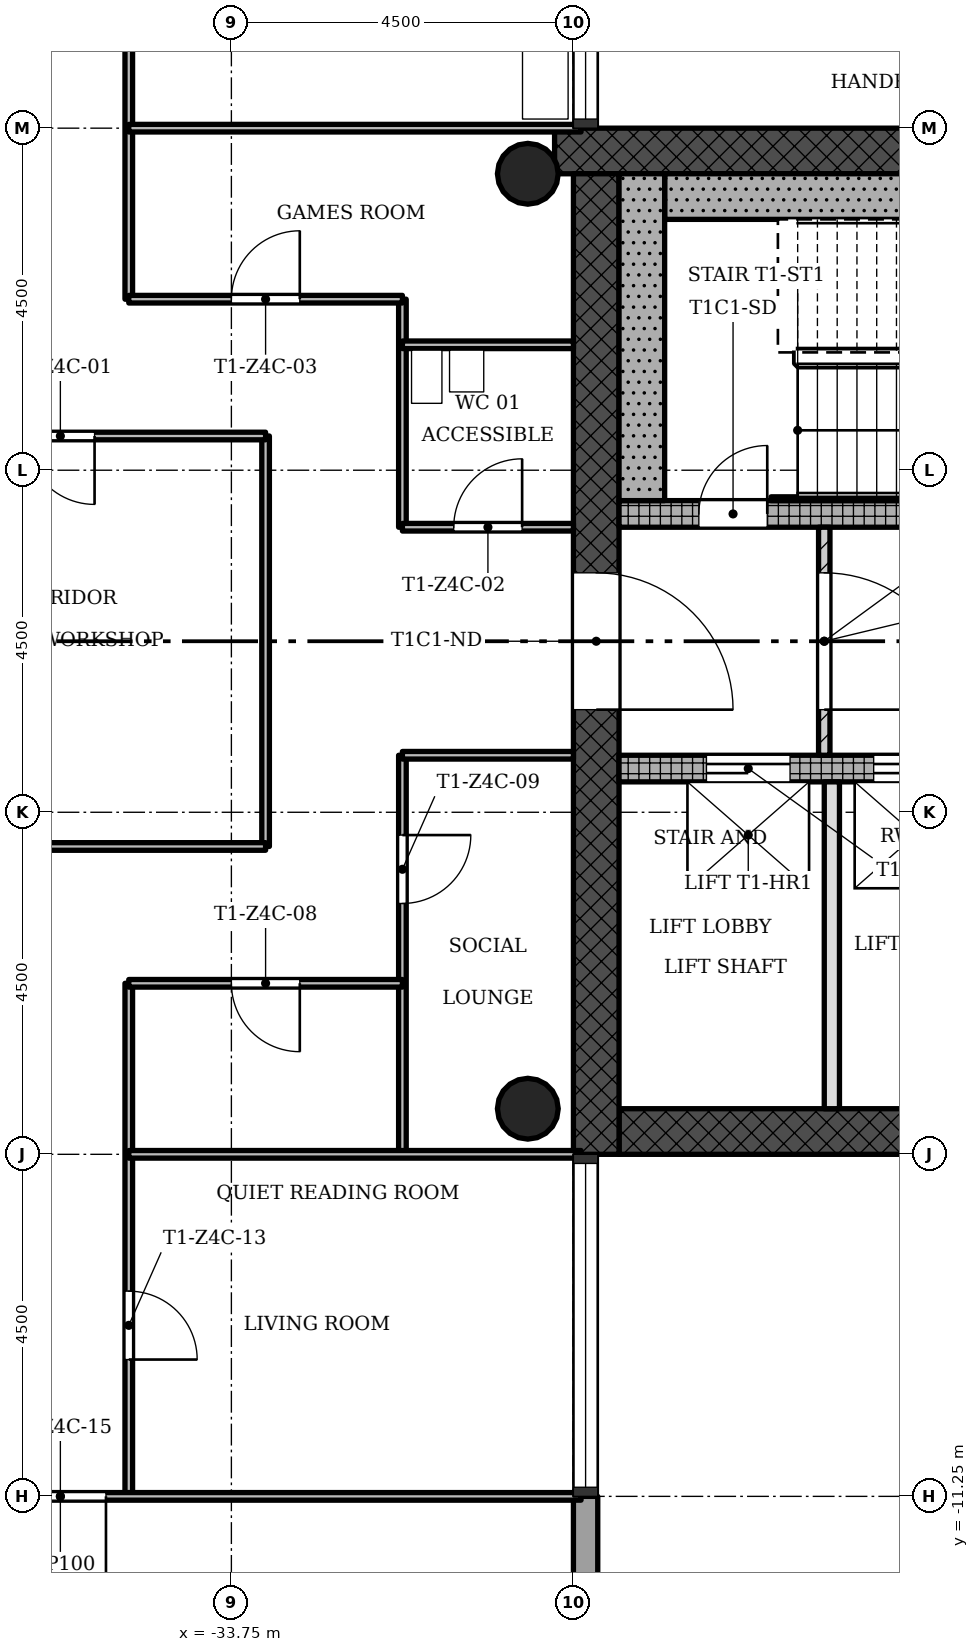
"""IFC4 building model, lengths in metres.
Left out: names, types, materials, properties, quantities, classifications, styles, units other than length and angle.
Written with IfcOpenShell. Run it as: python <this file> out.ifc"""

import sys

from ifc_helpers import new_model, si_unit, direction, frame, frame_2d, origin, origin_2d, place, context, subcontext, project, spatial, rectangle, hollow_circle, extrude, element, fill, save


model = new_model("IFC4")
c1 = context("Model", 3, precision=1e-05, world=origin(), true_north=direction((0.0, 1.0)))
c2 = subcontext(c1, "Body", "Model", "MODEL_VIEW")
j1 = project(units=[si_unit("LENGTHUNIT", "METRE"), si_unit("PLANEANGLEUNIT", "RADIAN")], contexts=[c1])
p1 = place(None, origin())
s1 = spatial("IfcSite", under=j1, at=p1, CompositionType="ELEMENT")
p2 = place(p1, origin())
s2 = spatial("IfcBuilding", under=s1, at=p2, CompositionType="ELEMENT")
p3 = place(p2, frame((0.0, 0.0, 185.8)))
s3 = spatial("IfcBuildingStorey", under=s2, at=p3, CompositionType="ELEMENT", Elevation=185.8)
p4 = place(p3, frame((-28.65, -6.45, 0.0), z_axis=(0.0, 0.0, 1.0), x_axis=(1.0, 0.0, 0.0)))
e1 = element("IfcWall", 1, at=p4, inside=s3, PredefinedType="SHEAR", context=c2, shape_type="SweptSolid", body=[
    extrude(rectangle(XDim=8.4, YDim=0.6, at=frame_2d((4.2, 0.0))), origin(), (0.0, 0.0, 1.0), 3.4),
])
p5 = place(p3, frame((-20.602, 6.45, 0.0), z_axis=(0.0, 0.0, 1.0), x_axis=(-1.0, 0.0, 0.0)))
e2 = element("IfcWall", 2, at=p5, inside=s3, PredefinedType="SHEAR", context=c2, shape_type="SweptSolid", body=[
    extrude(rectangle(XDim=8.896, YDim=0.6, at=frame_2d((4.448, 0.0))), origin(), (0.0, 0.0, 1.0), 3.4),
])
p6 = place(p3, frame((-28.95, 6.15, 0.0), z_axis=(0.0, 0.0, 1.0), x_axis=(0.0, -1.0, 0.0)))
e3 = element("IfcWall", 3, at=p6, inside=s3, PredefinedType="SHEAR", context=c2, shape_type="SweptSolid", body=[
    extrude(rectangle(XDim=12.9, YDim=0.6, at=frame_2d((6.45, 0.0))), origin(), (0.0, 0.0, 1.0), 3.4),
])
p7 = place(p6, frame((5.25, 0.0, 0.0)))
e4 = element("IfcOpeningElement", 4, at=p7, cuts=e3, PredefinedType="OPENING", context=c2, shape_type="SweptSolid", body=[
    extrude(rectangle(XDim=1.8, YDim=2.1, at=frame_2d((0.9, 1.05))), frame((0.0, 0.31, 0.0), z_axis=(0.0, -1.0, 0.0), x_axis=(1.0, 0.0, 0.0)), (0.0, 0.0, 1.0), 0.62),
])
p8 = place(p3, frame((-28.65, -1.675, 0.0), z_axis=(0.0, 0.0, 1.0), x_axis=(1.0, 0.0, 0.0)))
e5 = element("IfcWall", 5, at=p8, inside=s3, PredefinedType="SHEAR", context=c2, shape_type="SweptSolid", body=[
    extrude(rectangle(XDim=7.8, YDim=0.35, at=frame_2d((3.9, 0.0))), origin(), (0.0, 0.0, 1.0), 3.4),
])
p9 = place(p8, frame((1.15, 0.0, 0.0)))
e6 = element("IfcOpeningElement", 6, at=p9, cuts=e5, PredefinedType="OPENING", context=c2, shape_type="SweptSolid", body=[
    extrude(rectangle(XDim=1.1, YDim=2.1, at=frame_2d((0.55, 1.05))), frame((0.0, 0.185, 0.0), z_axis=(0.0, -1.0, 0.0), x_axis=(1.0, 0.0, 0.0)), (0.0, 0.0, 1.0), 0.37),
])
p10 = place(p8, frame((3.35, 0.0, 0.0)))
e7 = element("IfcOpeningElement", 7, at=p10, cuts=e5, PredefinedType="OPENING", context=c2, shape_type="SweptSolid", body=[
    extrude(rectangle(XDim=1.1, YDim=2.1, at=frame_2d((0.55, 1.05))), frame((0.0, 0.185, 0.0), z_axis=(0.0, -1.0, 0.0), x_axis=(1.0, 0.0, 0.0)), (0.0, 0.0, 1.0), 0.37),
])
p11 = place(p8, frame((5.55, 0.0, 0.0)))
e8 = element("IfcOpeningElement", 8, at=p11, cuts=e5, PredefinedType="OPENING", context=c2, shape_type="SweptSolid", body=[
    extrude(rectangle(XDim=1.1, YDim=2.1, at=frame_2d((0.55, 1.05))), frame((0.0, 0.185, 0.0), z_axis=(0.0, -1.0, 0.0), x_axis=(1.0, 0.0, 0.0)), (0.0, 0.0, 1.0), 0.37),
])
p12 = place(p3, frame((-28.65, 1.675, 0.0), z_axis=(0.0, 0.0, 1.0), x_axis=(1.0, 0.0, 0.0)))
e9 = element("IfcWall", 9, at=p12, inside=s3, PredefinedType="SHEAR", context=c2, shape_type="SweptSolid", body=[
    extrude(rectangle(XDim=7.8, YDim=0.35, at=frame_2d((3.9, 0.0))), origin(), (0.0, 0.0, 1.0), 3.4),
])
p13 = place(p12, frame((1.05, 0.0, 0.0)))
e10 = element("IfcOpeningElement", 10, at=p13, cuts=e9, PredefinedType="OPENING", context=c2, shape_type="SweptSolid", body=[
    extrude(rectangle(XDim=0.9, YDim=2.1, at=frame_2d((0.45, 1.05))), frame((0.0, 0.185, 0.0), z_axis=(0.0, -1.0, 0.0), x_axis=(1.0, 0.0, 0.0)), (0.0, 0.0, 1.0), 0.37),
])
for number, where, z_axis, x_axis in (
    (11, (-29.85, -6.15, 0.0), (0.0, 0.0, 1.0), (1.0, 0.0, 0.0)),
    (12, (-29.85, 6.15, 0.0), (0.0, 0.0, 1.0), (1.0, 0.0, 0.0)),
):
    element("IfcColumn", number, at=place(p3, frame(where, z_axis=z_axis, x_axis=x_axis)), inside=s3, PredefinedType="COLUMN", context=c2, shape_type="SweptSolid", body=[
        extrude(hollow_circle(Radius=0.4, WallThickness=0.028, at=origin_2d()), origin(), (0.0, 0.0, 1.0), 3.4),
    ])
p14 = place(p3, frame((-29.09, -12.75, 0.0), z_axis=(0.0, 0.0, 1.0), x_axis=(0.0, 1.0, 0.0)))
e13 = element("IfcWall", 13, at=p14, inside=s3, PredefinedType="STANDARD", context=c2, shape_type="SweptSolid", body=[
    extrude(rectangle(XDim=1.5, YDim=0.32, at=frame_2d((0.75, 0.0))), origin(), (0.0, 0.0, 1.0), 3.1),
])
p15 = place(p3, frame((-25.95, -1.5, 0.0), z_axis=(0.0, 0.0, 1.0), x_axis=(0.0, 1.0, 0.0)))
e14 = element("IfcWall", 14, at=p15, inside=s3, PredefinedType="PARTITIONING", context=c2, shape_type="SweptSolid", body=[
    extrude(rectangle(XDim=3.0, YDim=0.15, at=frame_2d((1.5, 0.0))), origin(), (0.0, 0.0, 1.0), 3.0),
])
p16 = place(p15, frame((0.6, 0.0, 0.0)))
e15 = element("IfcOpeningElement", 15, at=p16, cuts=e14, PredefinedType="OPENING", context=c2, shape_type="SweptSolid", body=[
    extrude(rectangle(XDim=1.8, YDim=2.1, at=frame_2d((0.9, 1.05))), frame((0.0, 0.085, 0.0), z_axis=(0.0, -1.0, 0.0), x_axis=(1.0, 0.0, 0.0)), (0.0, 0.0, 1.0), 0.17),
])
p17 = place(p3, frame((-25.85, -6.15, 0.0), z_axis=(0.0, 0.0, 1.0), x_axis=(0.0, 1.0, 0.0)))
e16 = element("IfcWall", 16, at=p17, inside=s3, PredefinedType="SOLIDWALL", context=c2, shape_type="SweptSolid", body=[
    extrude(rectangle(XDim=4.3, YDim=0.2, at=frame_2d((2.15, 0.0))), origin(), (0.0, 0.0, 1.0), 3.0),
])
p18 = place(p3, frame((-35.1, -11.25, 0.0), z_axis=(0.0, 0.0, 1.0), x_axis=(0.0, 1.0, 0.0)))
e17 = element("IfcWall", 17, at=p18, inside=s3, PredefinedType="PARTITIONING", context=c2, shape_type="SweptSolid", body=[
    extrude(rectangle(XDim=6.75, YDim=0.1, at=frame_2d((3.375, 0.0))), origin(), (0.0, 0.0, 1.0), 3.0),
])
p19 = place(p18, frame((1.8, 0.0, 0.0)))
e18 = element("IfcOpeningElement", 18, at=p19, cuts=e17, PredefinedType="OPENING", context=c2, shape_type="SweptSolid", body=[
    extrude(rectangle(XDim=0.9, YDim=2.1, at=frame_2d((0.45, 1.05))), frame((0.0, 0.06, 0.0), z_axis=(0.0, -1.0, 0.0), x_axis=(1.0, 0.0, 0.0)), (0.0, 0.0, 1.0), 0.12),
])
p20 = place(p3, frame((-35.1, 4.5, 0.0), z_axis=(0.0, 0.0, 1.0), x_axis=(0.0, 1.0, 0.0)))
e19 = element("IfcWall", 19, at=p20, inside=s3, PredefinedType="PARTITIONING", context=c2, shape_type="SweptSolid", body=[
    extrude(rectangle(XDim=4.05, YDim=0.1, at=frame_2d((2.025, 0.0))), origin(), (0.0, 0.0, 1.0), 3.0),
])
p21 = place(p3, frame((-33.3, -2.7, 0.0), z_axis=(0.0, 0.0, 1.0), x_axis=(0.0, 1.0, 0.0)))
e20 = element("IfcWall", 20, at=p21, inside=s3, PredefinedType="PARTITIONING", context=c2, shape_type="SweptSolid", body=[
    extrude(rectangle(XDim=5.4, YDim=0.1, at=frame_2d((2.7, 0.0))), origin(), (0.0, 0.0, 1.0), 3.0),
])
p22 = place(p3, frame((-31.5, -6.75, 0.0), z_axis=(0.0, 0.0, 1.0), x_axis=(0.0, 1.0, 0.0)))
e21 = element("IfcWall", 21, at=p22, inside=s3, PredefinedType="PARTITIONING", context=c2, shape_type="SweptSolid", body=[
    extrude(rectangle(XDim=5.25, YDim=0.1, at=frame_2d((2.625, 0.0))), origin(), (0.0, 0.0, 1.0), 3.0),
])
p23 = place(p22, frame((3.3, 0.0, 0.0)))
e22 = element("IfcOpeningElement", 22, at=p23, cuts=e21, PredefinedType="OPENING", context=c2, shape_type="SweptSolid", body=[
    extrude(rectangle(XDim=0.9, YDim=2.1, at=frame_2d((0.45, 1.05))), frame((0.0, 0.06, 0.0), z_axis=(0.0, -1.0, 0.0), x_axis=(1.0, 0.0, 0.0)), (0.0, 0.0, 1.0), 0.12),
])
p24 = place(p3, frame((-31.5, 1.5, 0.0), z_axis=(0.0, 0.0, 1.0), x_axis=(0.0, 1.0, 0.0)))
e23 = element("IfcWall", 23, at=p24, inside=s3, PredefinedType="PARTITIONING", context=c2, shape_type="SweptSolid", body=[
    extrude(rectangle(XDim=3.0, YDim=0.1, at=frame_2d((1.5, 0.0))), origin(), (0.0, 0.0, 1.0), 3.0),
])
p25 = place(p3, frame((-42.85, -11.25, 0.0), z_axis=(0.0, 0.0, 1.0), x_axis=(1.0, 0.0, 0.0)))
e24 = element("IfcWall", 24, at=p25, inside=s3, PredefinedType="PARTITIONING", context=c2, shape_type="SweptSolid", body=[
    extrude(rectangle(XDim=13.7, YDim=0.1, at=frame_2d((6.85, 0.0))), origin(), (0.0, 0.0, 1.0), 3.0),
])
p26 = place(p25, frame((6.25, 0.0, 0.0)))
e25 = element("IfcOpeningElement", 25, at=p26, cuts=e24, PredefinedType="OPENING", context=c2, shape_type="SweptSolid", body=[
    extrude(rectangle(XDim=1.2, YDim=2.1, at=frame_2d((0.6, 1.05))), frame((0.0, 0.06, 0.0), z_axis=(0.0, -1.0, 0.0), x_axis=(1.0, 0.0, 0.0)), (0.0, 0.0, 1.0), 0.12),
])
p27 = place(p3, frame((-35.1, -6.75, 0.0), z_axis=(0.0, 0.0, 1.0), x_axis=(1.0, 0.0, 0.0)))
e26 = element("IfcWall", 26, at=p27, inside=s3, PredefinedType="PARTITIONING", context=c2, shape_type="SweptSolid", body=[
    extrude(rectangle(XDim=5.95, YDim=0.1, at=frame_2d((2.975, 0.0))), origin(), (0.0, 0.0, 1.0), 3.0),
])
p28 = place(p3, frame((-35.1, -4.5, 0.0), z_axis=(0.0, 0.0, 1.0), x_axis=(1.0, 0.0, 0.0)))
e27 = element("IfcWall", 27, at=p28, inside=s3, PredefinedType="PARTITIONING", context=c2, shape_type="SweptSolid", body=[
    extrude(rectangle(XDim=3.6, YDim=0.1, at=frame_2d((1.8, 0.0))), origin(), (0.0, 0.0, 1.0), 3.0),
])
p29 = place(p28, frame((1.35, 0.0, 0.0)))
e28 = element("IfcOpeningElement", 28, at=p29, cuts=e27, PredefinedType="OPENING", context=c2, shape_type="SweptSolid", body=[
    extrude(rectangle(XDim=0.9, YDim=2.1, at=frame_2d((0.45, 1.05))), frame((0.0, 0.06, 0.0), z_axis=(0.0, -1.0, 0.0), x_axis=(1.0, 0.0, 0.0)), (0.0, 0.0, 1.0), 0.12),
])
p30 = place(p3, frame((-38.7, -2.7, 0.0), z_axis=(0.0, 0.0, 1.0), x_axis=(1.0, 0.0, 0.0)))
e29 = element("IfcWall", 29, at=p30, inside=s3, PredefinedType="PARTITIONING", context=c2, shape_type="SweptSolid", body=[
    extrude(rectangle(XDim=5.4, YDim=0.1, at=frame_2d((2.7, 0.0))), origin(), (0.0, 0.0, 1.0), 3.0),
])
p31 = place(p3, frame((-31.5, -1.5, 0.0), z_axis=(0.0, 0.0, 1.0), x_axis=(1.0, 0.0, 0.0)))
e30 = element("IfcWall", 30, at=p31, inside=s3, PredefinedType="PARTITIONING", context=c2, shape_type="SweptSolid", body=[
    extrude(rectangle(XDim=2.25, YDim=0.1, at=frame_2d((1.125, 0.0))), origin(), (0.0, 0.0, 1.0), 3.0),
])
p32 = place(p3, frame((-31.5, 1.5, 0.0), z_axis=(0.0, 0.0, 1.0), x_axis=(1.0, 0.0, 0.0)))
e31 = element("IfcWall", 31, at=p32, inside=s3, PredefinedType="PARTITIONING", context=c2, shape_type="SweptSolid", body=[
    extrude(rectangle(XDim=2.25, YDim=0.1, at=frame_2d((1.125, 0.0))), origin(), (0.0, 0.0, 1.0), 3.0),
])
p33 = place(p32, frame((0.675, 0.0, 0.0)))
e32 = element("IfcOpeningElement", 32, at=p33, cuts=e31, PredefinedType="OPENING", context=c2, shape_type="SweptSolid", body=[
    extrude(rectangle(XDim=0.9, YDim=2.1, at=frame_2d((0.45, 1.05))), frame((0.0, 0.06, 0.0), z_axis=(0.0, -1.0, 0.0), x_axis=(1.0, 0.0, 0.0)), (0.0, 0.0, 1.0), 0.12),
])
p34 = place(p3, frame((-38.7, 2.7, 0.0), z_axis=(0.0, 0.0, 1.0), x_axis=(1.0, 0.0, 0.0)))
e33 = element("IfcWall", 33, at=p34, inside=s3, PredefinedType="PARTITIONING", context=c2, shape_type="SweptSolid", body=[
    extrude(rectangle(XDim=5.4, YDim=0.1, at=frame_2d((2.7, 0.0))), origin(), (0.0, 0.0, 1.0), 3.0),
])
p35 = place(p34, frame((2.25, 0.0, 0.0)))
e34 = element("IfcOpeningElement", 34, at=p35, cuts=e33, PredefinedType="OPENING", context=c2, shape_type="SweptSolid", body=[
    extrude(rectangle(XDim=0.9, YDim=2.1, at=frame_2d((0.45, 1.05))), frame((0.0, 0.06, 0.0), z_axis=(0.0, -1.0, 0.0), x_axis=(1.0, 0.0, 0.0)), (0.0, 0.0, 1.0), 0.12),
])
p36 = place(p3, frame((-31.5, 3.9, 0.0), z_axis=(0.0, 0.0, 1.0), x_axis=(1.0, 0.0, 0.0)))
e35 = element("IfcWall", 35, at=p36, inside=s3, PredefinedType="PARTITIONING", context=c2, shape_type="SweptSolid", body=[
    extrude(rectangle(XDim=2.25, YDim=0.1, at=frame_2d((1.125, 0.0))), origin(), (0.0, 0.0, 1.0), 3.0),
])
p37 = place(p3, frame((-35.1, 4.5, 0.0), z_axis=(0.0, 0.0, 1.0), x_axis=(1.0, 0.0, 0.0)))
e36 = element("IfcWall", 36, at=p37, inside=s3, PredefinedType="PARTITIONING", context=c2, shape_type="SweptSolid", body=[
    extrude(rectangle(XDim=3.6, YDim=0.1, at=frame_2d((1.8, 0.0))), origin(), (0.0, 0.0, 1.0), 3.0),
])
p38 = place(p37, frame((1.35, 0.0, 0.0)))
e37 = element("IfcOpeningElement", 37, at=p38, cuts=e36, PredefinedType="OPENING", context=c2, shape_type="SweptSolid", body=[
    extrude(rectangle(XDim=0.9, YDim=2.1, at=frame_2d((0.45, 1.05))), frame((0.0, 0.06, 0.0), z_axis=(0.0, -1.0, 0.0), x_axis=(1.0, 0.0, 0.0)), (0.0, 0.0, 1.0), 0.12),
])
p39 = place(p3, frame((-35.1, 6.75, 0.0), z_axis=(0.0, 0.0, 1.0), x_axis=(1.0, 0.0, 0.0)))
e38 = element("IfcWall", 38, at=p39, inside=s3, PredefinedType="PARTITIONING", context=c2, shape_type="SweptSolid", body=[
    extrude(rectangle(XDim=5.95, YDim=0.1, at=frame_2d((2.975, 0.0))), origin(), (0.0, 0.0, 1.0), 3.0),
])
p40 = place(p3, frame((-28.05, 5.85, 0.0), z_axis=(0.0, 0.0, 1.0), x_axis=(1.0, 0.0, 0.0)))
e39 = element("IfcWall", 39, at=p40, inside=s3, PredefinedType="SHEAR", context=c2, shape_type="SweptSolid", body=[
    extrude(rectangle(XDim=6.6, YDim=0.6, at=frame_2d((3.3, 0.0))), origin(), (0.0, 0.0, 1.0), 3.4),
])
p41 = place(p3, frame((-28.35, 1.85, 0.0), z_axis=(0.0, 0.0, 1.0), x_axis=(0.0, 1.0, 0.0)))
e40 = element("IfcWall", 40, at=p41, inside=s3, PredefinedType="SHEAR", context=c2, shape_type="SweptSolid", body=[
    extrude(rectangle(XDim=4.3, YDim=0.6, at=frame_2d((2.15, 0.0))), origin(), (0.0, 0.0, 1.0), 3.4),
])
p42 = place(p3, frame((-26.65, 1.875, 0.0), z_axis=(0.0, 0.0, 1.0), x_axis=(1.0, 0.0, 0.0)))
e41 = element("IfcWall", 41, at=p42, inside=s3, PredefinedType="SHEAR", context=c2, shape_type="SweptSolid", body=[
    extrude(rectangle(XDim=5.2, YDim=0.05, at=frame_2d((2.6, 0.0))), origin(), (0.0, 0.0, 1.0), 3.4),
])
p43 = place(p16, origin())
e42 = element("IfcDoor", 42, at=p43, inside=s3, OperationType="SINGLE_SWING_LEFT", PredefinedType="DOOR", context=c2, shape_type="SweptSolid", body=[
    extrude(rectangle(XDim=1.8, YDim=2.1, at=frame_2d((0.9, 1.05))), frame((0.0, 0.025, 0.0), z_axis=(0.0, -1.0, 0.0), x_axis=(1.0, 0.0, 0.0)), (0.0, 0.0, 1.0), 0.05),
])
fill(e15, e42)
p44 = place(p35, origin())
e43 = element("IfcDoor", 43, at=p44, inside=s3, OperationType="SINGLE_SWING_RIGHT", PredefinedType="DOOR", context=c2, shape_type="SweptSolid", body=[
    extrude(rectangle(XDim=0.9, YDim=2.1, at=frame_2d((0.45, 1.05))), frame((0.0, 0.025, 0.0), z_axis=(0.0, -1.0, 0.0), x_axis=(1.0, 0.0, 0.0)), (0.0, 0.0, 1.0), 0.05),
])
fill(e34, e43)
p45 = place(p33, origin())
e44 = element("IfcDoor", 44, at=p45, inside=s3, OperationType="SINGLE_SWING_LEFT", PredefinedType="DOOR", context=c2, shape_type="SweptSolid", body=[
    extrude(rectangle(XDim=0.9, YDim=2.1, at=frame_2d((0.45, 1.05))), frame((0.0, 0.025, 0.0), z_axis=(0.0, -1.0, 0.0), x_axis=(1.0, 0.0, 0.0)), (0.0, 0.0, 1.0), 0.05),
])
fill(e32, e44)
p46 = place(p38, origin())
e45 = element("IfcDoor", 45, at=p46, inside=s3, OperationType="SINGLE_SWING_LEFT", PredefinedType="DOOR", context=c2, shape_type="SweptSolid", body=[
    extrude(rectangle(XDim=0.9, YDim=2.1, at=frame_2d((0.45, 1.05))), frame((0.0, 0.025, 0.0), z_axis=(0.0, -1.0, 0.0), x_axis=(1.0, 0.0, 0.0)), (0.0, 0.0, 1.0), 0.05),
])
fill(e37, e45)
p47 = place(p29, origin())
e46 = element("IfcDoor", 46, at=p47, inside=s3, OperationType="SINGLE_SWING_RIGHT", PredefinedType="DOOR", context=c2, shape_type="SweptSolid", body=[
    extrude(rectangle(XDim=0.9, YDim=2.1, at=frame_2d((0.45, 1.05))), frame((0.0, 0.025, 0.0), z_axis=(0.0, -1.0, 0.0), x_axis=(1.0, 0.0, 0.0)), (0.0, 0.0, 1.0), 0.05),
])
fill(e28, e46)
p48 = place(p23, origin())
e47 = element("IfcDoor", 47, at=p48, inside=s3, OperationType="SINGLE_SWING_RIGHT", PredefinedType="DOOR", context=c2, shape_type="SweptSolid", body=[
    extrude(rectangle(XDim=0.9, YDim=2.1, at=frame_2d((0.45, 1.05))), frame((0.0, 0.025, 0.0), z_axis=(0.0, -1.0, 0.0), x_axis=(1.0, 0.0, 0.0)), (0.0, 0.0, 1.0), 0.05),
])
fill(e22, e47)
p49 = place(p19, origin())
e48 = element("IfcDoor", 48, at=p49, inside=s3, OperationType="SINGLE_SWING_LEFT", PredefinedType="DOOR", context=c2, shape_type="SweptSolid", body=[
    extrude(rectangle(XDim=0.9, YDim=2.1, at=frame_2d((0.45, 1.05))), frame((0.0, 0.025, 0.0), z_axis=(0.0, -1.0, 0.0), x_axis=(1.0, 0.0, 0.0)), (0.0, 0.0, 1.0), 0.05),
])
fill(e18, e48)
p50 = place(p26, origin())
e49 = element("IfcDoor", 49, at=p50, inside=s3, OperationType="SINGLE_SWING_RIGHT", PredefinedType="DOOR", context=c2, shape_type="SweptSolid", body=[
    extrude(rectangle(XDim=1.2, YDim=2.1, at=frame_2d((0.6, 1.05))), frame((0.0, 0.025, 0.0), z_axis=(0.0, -1.0, 0.0), x_axis=(1.0, 0.0, 0.0)), (0.0, 0.0, 1.0), 0.05),
])
fill(e25, e49)
p51 = place(p13, origin())
e50 = element("IfcDoor", 50, at=p51, inside=s3, OperationType="SINGLE_SWING_LEFT", PredefinedType="DOOR", context=c2, shape_type="SweptSolid", body=[
    extrude(rectangle(XDim=0.9, YDim=2.1, at=frame_2d((0.45, 1.05))), frame((0.0, 0.025, 0.0), z_axis=(0.0, -1.0, 0.0), x_axis=(1.0, 0.0, 0.0)), (0.0, 0.0, 1.0), 0.05),
])
fill(e10, e50)
p52 = place(p9, origin())
e51 = element("IfcDoor", 51, at=p52, inside=s3, OperationType="SLIDING_TO_LEFT", PredefinedType="DOOR", context=c2, shape_type="SweptSolid", body=[
    extrude(rectangle(XDim=1.1, YDim=2.1, at=frame_2d((0.55, 1.05))), frame((0.0, 0.025, 0.0), z_axis=(0.0, -1.0, 0.0), x_axis=(1.0, 0.0, 0.0)), (0.0, 0.0, 1.0), 0.05),
])
fill(e6, e51)
p53 = place(p10, origin())
e52 = element("IfcDoor", 52, at=p53, inside=s3, OperationType="SLIDING_TO_LEFT", PredefinedType="DOOR", context=c2, shape_type="SweptSolid", body=[
    extrude(rectangle(XDim=1.1, YDim=2.1, at=frame_2d((0.55, 1.05))), frame((0.0, 0.025, 0.0), z_axis=(0.0, -1.0, 0.0), x_axis=(1.0, 0.0, 0.0)), (0.0, 0.0, 1.0), 0.05),
])
fill(e7, e52)
p54 = place(p7, origin())
e53 = element("IfcDoor", 53, at=p54, inside=s3, OperationType="SINGLE_SWING_LEFT", PredefinedType="DOOR", context=c2, shape_type="SweptSolid", body=[
    extrude(rectangle(XDim=1.8, YDim=2.1, at=frame_2d((0.9, 1.05))), frame((0.0, 0.025, 0.0), z_axis=(0.0, -1.0, 0.0), x_axis=(1.0, 0.0, 0.0)), (0.0, 0.0, 1.0), 0.05),
])
fill(e4, e53)
save(model, sys.argv[1])
